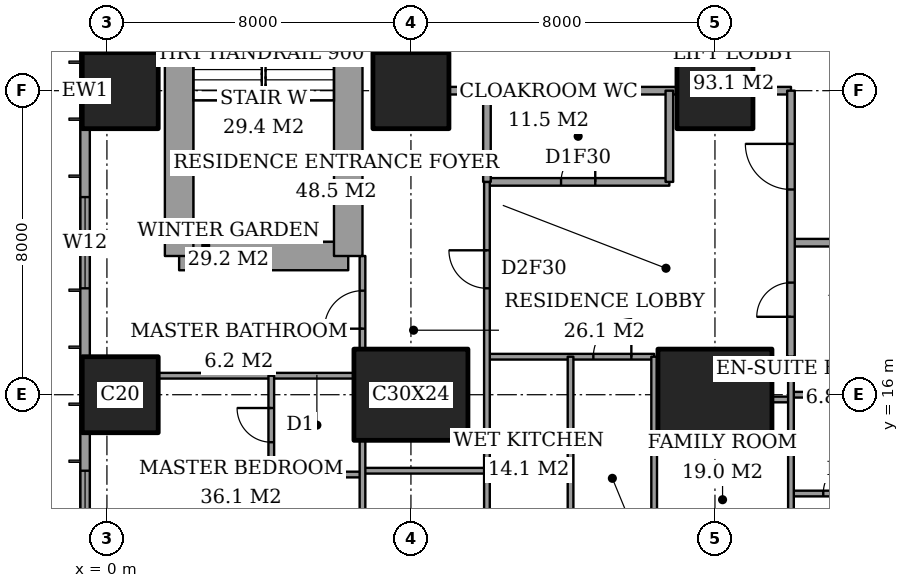
"""IFC4 building model, lengths in metres.
Left out: names, types, materials, properties, quantities, classifications, styles, units other than length and angle.
Written with IfcOpenShell. Run it as: python <this file> out.ifc"""

import sys

from ifc_helpers import new_model, si_unit, direction, frame, frame_2d, origin, origin_2d, place, context, subcontext, project, spatial, rectangle, extrude, element, fill, save


model = new_model("IFC4")
c1 = context("Model", 3, precision=1e-05, world=origin(), true_north=direction((0.0, 1.0)))
c2 = subcontext(c1, "Body", "Model", "MODEL_VIEW")
j1 = project(units=[si_unit("LENGTHUNIT", "METRE"), si_unit("PLANEANGLEUNIT", "RADIAN")], contexts=[c1])
p1 = place(None, origin())
s1 = spatial("IfcSite", under=j1, at=p1, CompositionType="ELEMENT")
p2 = place(p1, origin())
s2 = spatial("IfcBuilding", under=s1, at=p2, CompositionType="ELEMENT")
p3 = place(p2, frame((0.0, 0.0, 135.8)))
s3 = spatial("IfcBuildingStorey", under=s2, at=p3, CompositionType="ELEMENT", Elevation=135.8)
for number, where, z_axis, x_axis in (
    (1, (0.35, 16.0, 0.0), (0.0, 0.0, 1.0), (1.0, 0.0, 0.0)),
    (2, (0.35, 24.0, 0.0), (0.0, 0.0, 1.0), (1.0, 0.0, 0.0)),
):
    element("IfcColumn", number, at=place(p3, frame(where, z_axis=z_axis, x_axis=x_axis)), inside=s3, PredefinedType="COLUMN", context=c2, shape_type="SweptSolid", body=[
        extrude(rectangle(XDim=2.0, YDim=2.0, at=origin_2d()), origin(), (0.0, 0.0, 1.0), 3.6),
    ])
p4 = place(p3, frame((8.0, 16.0, 0.0), z_axis=(0.0, 0.0, 1.0), x_axis=(1.0, 0.0, 0.0)))
e3 = element("IfcColumn", 3, at=p4, inside=s3, PredefinedType="COLUMN", context=c2, shape_type="SweptSolid", body=[
    extrude(rectangle(XDim=3.0, YDim=2.4, at=origin_2d()), origin(), (0.0, 0.0, 1.0), 3.6),
])
p5 = place(p3, frame((8.0, 24.0, 0.0), z_axis=(0.0, 0.0, 1.0), x_axis=(1.0, 0.0, 0.0)))
e4 = element("IfcColumn", 4, at=p5, inside=s3, PredefinedType="COLUMN", context=c2, shape_type="SweptSolid", body=[
    extrude(rectangle(XDim=2.0, YDim=2.0, at=origin_2d()), origin(), (0.0, 0.0, 1.0), 3.6),
])
p6 = place(p3, frame((16.0, 16.0, 0.0), z_axis=(0.0, 0.0, 1.0), x_axis=(1.0, 0.0, 0.0)))
e5 = element("IfcColumn", 5, at=p6, inside=s3, PredefinedType="COLUMN", context=c2, shape_type="SweptSolid", body=[
    extrude(rectangle(XDim=3.0, YDim=2.4, at=origin_2d()), origin(), (0.0, 0.0, 1.0), 3.6),
])
p7 = place(p3, frame((16.0, 24.0, 0.0), z_axis=(0.0, 0.0, 1.0), x_axis=(1.0, 0.0, 0.0)))
e6 = element("IfcColumn", 6, at=p7, inside=s3, PredefinedType="COLUMN", context=c2, shape_type="SweptSolid", body=[
    extrude(rectangle(XDim=2.0, YDim=2.0, at=origin_2d()), origin(), (0.0, 0.0, 1.0), 3.6),
])
p8 = place(p3, frame((1.9, 19.65, 0.0), z_axis=(0.0, 0.0, 1.0), x_axis=(1.0, 0.0, 0.0)))
e7 = element("IfcWall", 7, at=p8, inside=s3, PredefinedType="SHEAR", context=c2, shape_type="SweptSolid", body=[
    extrude(rectangle(XDim=4.45, YDim=0.75, at=frame_2d((2.225, 0.0))), origin(), (0.0, 0.0, 1.0), 3.6),
])
p9 = place(p3, frame((6.35, 19.65, 0.0), z_axis=(0.0, 0.0, 1.0), x_axis=(0.0, 1.0, 0.0)))
e8 = element("IfcWall", 8, at=p9, inside=s3, PredefinedType="SHEAR", context=c2, shape_type="SweptSolid", body=[
    extrude(rectangle(XDim=8.7, YDim=0.75, at=frame_2d((4.35, 0.0))), origin(), (0.0, 0.0, 1.0), 3.6),
])
p10 = place(p9, frame((6.725, 0.0, 0.0)))
e9 = element("IfcOpeningElement", 9, at=p10, cuts=e8, PredefinedType="OPENING", context=c2, shape_type="SweptSolid", body=[
    extrude(rectangle(XDim=1.0, YDim=2.1, at=frame_2d((0.5, 1.05))), frame((0.0, 0.385, 0.0), z_axis=(0.0, -1.0, 0.0), x_axis=(1.0, 0.0, 0.0)), (0.0, 0.0, 1.0), 0.77),
])
p11 = place(p3, frame((1.9, 28.35, 0.0), z_axis=(0.0, 0.0, 1.0), x_axis=(0.0, -1.0, 0.0)))
e10 = element("IfcWall", 10, at=p11, inside=s3, PredefinedType="SHEAR", context=c2, shape_type="SweptSolid", body=[
    extrude(rectangle(XDim=8.7, YDim=0.75, at=frame_2d((4.35, 0.0))), origin(), (0.0, 0.0, 1.0), 3.6),
])
p12 = place(p3, frame((-0.575, 44.825, 0.0), z_axis=(0.0, 0.0, 1.0), x_axis=(0.0, -1.0, 0.0)))
e11 = element("IfcWall", 11, at=p12, inside=s3, PredefinedType="SOLIDWALL", context=c2, shape_type="SweptSolid", body=[
    extrude(rectangle(XDim=41.65, YDim=0.25, at=frame_2d((20.825, 0.0))), origin(), (0.0, 0.0, 1.0), 3.6),
])
p13 = place(p12, frame((0.775, 0.0, 0.4)))
e12 = element("IfcOpeningElement", 12, at=p13, cuts=e11, PredefinedType="OPENING", context=c2, shape_type="SweptSolid", body=[
    extrude(rectangle(XDim=2.4, YDim=2.2, at=frame_2d((1.2, 1.1))), frame((0.0, 0.135, 0.0), z_axis=(0.0, -1.0, 0.0), x_axis=(1.0, 0.0, 0.0)), (0.0, 0.0, 1.0), 0.27),
])
p14 = place(p12, frame((6.1, 0.0, 0.4)))
e13 = element("IfcOpeningElement", 13, at=p14, cuts=e11, PredefinedType="OPENING", context=c2, shape_type="SweptSolid", body=[
    extrude(rectangle(XDim=1.2, YDim=2.2, at=frame_2d((0.6, 1.1))), frame((0.0, 0.135, 0.0), z_axis=(0.0, -1.0, 0.0), x_axis=(1.0, 0.0, 0.0)), (0.0, 0.0, 1.0), 0.27),
])
p15 = place(p12, frame((8.425, 0.0, 0.4)))
e14 = element("IfcOpeningElement", 14, at=p15, cuts=e11, PredefinedType="OPENING", context=c2, shape_type="SweptSolid", body=[
    extrude(rectangle(XDim=2.4, YDim=2.2, at=frame_2d((1.2, 1.1))), frame((0.0, 0.135, 0.0), z_axis=(0.0, -1.0, 0.0), x_axis=(1.0, 0.0, 0.0)), (0.0, 0.0, 1.0), 0.27),
])
p16 = place(p12, frame((15.625, 0.0, 0.4)))
e15 = element("IfcOpeningElement", 15, at=p16, cuts=e11, PredefinedType="OPENING", context=c2, shape_type="SweptSolid", body=[
    extrude(rectangle(XDim=2.4, YDim=2.2, at=frame_2d((1.2, 1.1))), frame((0.0, 0.135, 0.0), z_axis=(0.0, -1.0, 0.0), x_axis=(1.0, 0.0, 0.0)), (0.0, 0.0, 1.0), 0.27),
])
p17 = place(p12, frame((23.625, 0.0, 0.4)))
e16 = element("IfcOpeningElement", 16, at=p17, cuts=e11, PredefinedType="OPENING", context=c2, shape_type="SweptSolid", body=[
    extrude(rectangle(XDim=2.4, YDim=2.2, at=frame_2d((1.2, 1.1))), frame((0.0, 0.135, 0.0), z_axis=(0.0, -1.0, 0.0), x_axis=(1.0, 0.0, 0.0)), (0.0, 0.0, 1.0), 0.27),
])
p18 = place(p12, frame((30.825, 0.0, 0.4)))
e17 = element("IfcOpeningElement", 17, at=p18, cuts=e11, PredefinedType="OPENING", context=c2, shape_type="SweptSolid", body=[
    extrude(rectangle(XDim=2.4, YDim=2.2, at=frame_2d((1.2, 1.1))), frame((0.0, 0.135, 0.0), z_axis=(0.0, -1.0, 0.0), x_axis=(1.0, 0.0, 0.0)), (0.0, 0.0, 1.0), 0.27),
])
p19 = place(p12, frame((34.5, 0.0, 0.4)))
e18 = element("IfcOpeningElement", 18, at=p19, cuts=e11, PredefinedType="OPENING", context=c2, shape_type="SweptSolid", body=[
    extrude(rectangle(XDim=1.2, YDim=2.2, at=frame_2d((0.6, 1.1))), frame((0.0, 0.135, 0.0), z_axis=(0.0, -1.0, 0.0), x_axis=(1.0, 0.0, 0.0)), (0.0, 0.0, 1.0), 0.27),
])
p20 = place(p12, frame((38.475, 0.0, 0.4)))
e19 = element("IfcOpeningElement", 19, at=p20, cuts=e11, PredefinedType="OPENING", context=c2, shape_type="SweptSolid", body=[
    extrude(rectangle(XDim=2.4, YDim=2.2, at=frame_2d((1.2, 1.1))), frame((0.0, 0.135, 0.0), z_axis=(0.0, -1.0, 0.0), x_axis=(1.0, 0.0, 0.0)), (0.0, 0.0, 1.0), 0.27),
])
p21 = place(p3, frame((18.0, 13.4, 0.0), z_axis=(0.0, 0.0, 1.0), x_axis=(1.0, 0.0, 0.0)))
e20 = element("IfcWall", 20, at=p21, inside=s3, PredefinedType="PARTITIONING", context=c2, shape_type="SweptSolid", body=[
    extrude(rectangle(XDim=2.6, YDim=0.15, at=frame_2d((1.3, 0.0))), origin(), (0.0, 0.0, 1.0), 3.35),
])
p22 = place(p21, frame((0.85, 0.0, 0.0)))
e21 = element("IfcOpeningElement", 21, at=p22, cuts=e20, PredefinedType="OPENING", context=c2, shape_type="SweptSolid", body=[
    extrude(rectangle(XDim=0.9, YDim=2.1, at=frame_2d((0.45, 1.05))), frame((0.0, 0.085, 0.0), z_axis=(0.0, -1.0, 0.0), x_axis=(1.0, 0.0, 0.0)), (0.0, 0.0, 1.0), 0.17),
])
p23 = place(p3, frame((4.325, 13.9, 0.0), z_axis=(0.0, 0.0, 1.0), x_axis=(1.0, 0.0, 0.0)))
e22 = element("IfcWall", 22, at=p23, inside=s3, PredefinedType="PARTITIONING", context=c2, shape_type="SweptSolid", body=[
    extrude(rectangle(XDim=2.4, YDim=0.15, at=frame_2d((1.2, 0.0))), origin(), (0.0, 0.0, 1.0), 3.35),
])
p24 = place(p3, frame((6.725, 14.0, 0.0), z_axis=(0.0, 0.0, 1.0), x_axis=(1.0, 0.0, 0.0)))
e23 = element("IfcWall", 23, at=p24, inside=s3, PredefinedType="PARTITIONING", context=c2, shape_type="SweptSolid", body=[
    extrude(rectangle(XDim=3.275, YDim=0.15, at=frame_2d((1.637, 0.0))), origin(), (0.0, 0.0, 1.0), 3.35),
])
p25 = place(p3, frame((17.5, 15.875, 0.0), z_axis=(0.0, 0.0, 1.0), x_axis=(1.0, 0.0, 0.0)))
e24 = element("IfcWall", 24, at=p25, inside=s3, PredefinedType="PARTITIONING", context=c2, shape_type="SweptSolid", body=[
    extrude(rectangle(XDim=0.5, YDim=0.15, at=frame_2d((0.25, 0.0))), origin(), (0.0, 0.0, 1.0), 2.634),
])
p26 = place(p3, frame((18.0, 16.0, 0.0), z_axis=(0.0, 0.0, 1.0), x_axis=(1.0, 0.0, 0.0)))
e25 = element("IfcWall", 25, at=p26, inside=s3, PredefinedType="PARTITIONING", context=c2, shape_type="SweptSolid", body=[
    extrude(rectangle(XDim=6.0, YDim=0.15, at=frame_2d((3.0, 0.0))), origin(), (0.0, 0.0, 1.0), 2.634),
])
p27 = place(p3, frame((1.35, 16.5, 0.0), z_axis=(0.0, 0.0, 1.0), x_axis=(1.0, 0.0, 0.0)))
e26 = element("IfcWall", 26, at=p27, inside=s3, PredefinedType="PARTITIONING", context=c2, shape_type="SweptSolid", body=[
    extrude(rectangle(XDim=5.15, YDim=0.15, at=frame_2d((2.575, 0.0))), origin(), (0.0, 0.0, 1.0), 3.35),
])
p28 = place(p3, frame((10.0, 17.0, 0.0), z_axis=(0.0, 0.0, 1.0), x_axis=(1.0, 0.0, 0.0)))
e27 = element("IfcWall", 27, at=p28, inside=s3, PredefinedType="PARTITIONING", context=c2, shape_type="SweptSolid", body=[
    extrude(rectangle(XDim=4.4, YDim=0.15, at=frame_2d((2.2, 0.0))), origin(), (0.0, 0.0, 1.0), 3.35),
])
p29 = place(p28, frame((2.8, 0.0, 0.0)))
e28 = element("IfcOpeningElement", 28, at=p29, cuts=e27, PredefinedType="OPENING", context=c2, shape_type="SweptSolid", body=[
    extrude(rectangle(XDim=1.0, YDim=2.1, at=frame_2d((0.5, 1.05))), frame((0.0, 0.085, 0.0), z_axis=(0.0, -1.0, 0.0), x_axis=(1.0, 0.0, 0.0)), (0.0, 0.0, 1.0), 0.17),
])
p30 = place(p3, frame((18.0, 20.0, 0.0), z_axis=(0.0, 0.0, 1.0), x_axis=(1.0, 0.0, 0.0)))
e29 = element("IfcWall", 29, at=p30, inside=s3, PredefinedType="PARTITIONING", context=c2, shape_type="SweptSolid", body=[
    extrude(rectangle(XDim=6.0, YDim=0.2, at=frame_2d((3.0, 0.0))), origin(), (0.0, 0.0, 1.0), 3.35),
])
p31 = place(p3, frame((10.0, 21.6, 0.0), z_axis=(0.0, 0.0, 1.0), x_axis=(1.0, 0.0, 0.0)))
e30 = element("IfcWall", 30, at=p31, inside=s3, PredefinedType="PARTITIONING", context=c2, shape_type="SweptSolid", body=[
    extrude(rectangle(XDim=4.8, YDim=0.2, at=frame_2d((2.4, 0.0))), origin(), (0.0, 0.0, 1.0), 3.35),
])
p32 = place(p31, frame((1.95, 0.0, 0.0)))
e31 = element("IfcOpeningElement", 31, at=p32, cuts=e30, PredefinedType="OPENING", context=c2, shape_type="SweptSolid", body=[
    extrude(rectangle(XDim=0.9, YDim=2.1, at=frame_2d((0.45, 1.05))), frame((0.0, 0.11, 0.0), z_axis=(0.0, -1.0, 0.0), x_axis=(1.0, 0.0, 0.0)), (0.0, 0.0, 1.0), 0.22),
])
p33 = place(p3, frame((9.0, 24.0, 0.0), z_axis=(0.0, 0.0, 1.0), x_axis=(1.0, 0.0, 0.0)))
e32 = element("IfcWall", 32, at=p33, inside=s3, PredefinedType="PARTITIONING", context=c2, shape_type="SweptSolid", body=[
    extrude(rectangle(XDim=6.0, YDim=0.2, at=frame_2d((3.0, 0.0))), origin(), (0.0, 0.0, 1.0), 3.35),
])
p34 = place(p3, frame((17.0, 24.0, 0.0), z_axis=(0.0, 0.0, 1.0), x_axis=(1.0, 0.0, 0.0)))
e33 = element("IfcWall", 33, at=p34, inside=s3, PredefinedType="PARTITIONING", context=c2, shape_type="SweptSolid", body=[
    extrude(rectangle(XDim=1.0, YDim=0.2, at=frame_2d((0.5, 0.0))), origin(), (0.0, 0.0, 1.0), 3.35),
])
p35 = place(p3, frame((4.325, 13.9, 0.0), z_axis=(0.0, 0.0, 1.0), x_axis=(0.0, 1.0, 0.0)))
e34 = element("IfcWall", 34, at=p35, inside=s3, PredefinedType="PARTITIONING", context=c2, shape_type="SweptSolid", body=[
    extrude(rectangle(XDim=2.6, YDim=0.15, at=frame_2d((1.3, 0.0))), origin(), (0.0, 0.0, 1.0), 3.35),
])
p36 = place(p35, frame((0.85, 0.0, 0.0)))
e35 = element("IfcOpeningElement", 35, at=p36, cuts=e34, PredefinedType="OPENING", context=c2, shape_type="SweptSolid", body=[
    extrude(rectangle(XDim=0.9, YDim=2.1, at=frame_2d((0.45, 1.05))), frame((0.0, 0.085, 0.0), z_axis=(0.0, -1.0, 0.0), x_axis=(1.0, 0.0, 0.0)), (0.0, 0.0, 1.0), 0.17),
])
p37 = place(p3, frame((6.725, 10.6, 0.0), z_axis=(0.0, 0.0, 1.0), x_axis=(0.0, 1.0, 0.0)))
e36 = element("IfcWall", 36, at=p37, inside=s3, PredefinedType="PARTITIONING", context=c2, shape_type="SweptSolid", body=[
    extrude(rectangle(XDim=4.2, YDim=0.15, at=frame_2d((2.1, 0.0))), origin(), (0.0, 0.0, 1.0), 3.35),
])
p38 = place(p37, frame((1.2, 0.0, 0.0)))
e37 = element("IfcOpeningElement", 37, at=p38, cuts=e36, PredefinedType="OPENING", context=c2, shape_type="SweptSolid", body=[
    extrude(rectangle(XDim=0.9, YDim=2.1, at=frame_2d((0.45, 1.05))), frame((0.0, 0.085, 0.0), z_axis=(0.0, -1.0, 0.0), x_axis=(1.0, 0.0, 0.0)), (0.0, 0.0, 1.0), 0.17),
])
p39 = place(p3, frame((6.725, 17.2, 0.0), z_axis=(0.0, 0.0, 1.0), x_axis=(0.0, 1.0, 0.0)))
e38 = element("IfcWall", 38, at=p39, inside=s3, PredefinedType="PARTITIONING", context=c2, shape_type="SweptSolid", body=[
    extrude(rectangle(XDim=2.45, YDim=0.15, at=frame_2d((1.225, 0.0))), origin(), (0.0, 0.0, 1.0), 3.35),
])
p40 = place(p39, frame((0.538, 0.0, 0.0)))
e39 = element("IfcOpeningElement", 39, at=p40, cuts=e38, PredefinedType="OPENING", context=c2, shape_type="SweptSolid", body=[
    extrude(rectangle(XDim=1.0, YDim=2.1, at=frame_2d((0.5, 1.05))), frame((0.0, 0.085, 0.0), z_axis=(0.0, -1.0, 0.0), x_axis=(1.0, 0.0, 0.0)), (0.0, 0.0, 1.0), 0.17),
])
p41 = place(p3, frame((10.0, 21.6, 0.0), z_axis=(0.0, 0.0, 1.0), x_axis=(0.0, 1.0, 0.0)))
e40 = element("IfcWall", 40, at=p41, inside=s3, PredefinedType="PARTITIONING", context=c2, shape_type="SweptSolid", body=[
    extrude(rectangle(XDim=2.4, YDim=0.2, at=frame_2d((1.2, 0.0))), origin(), (0.0, 0.0, 1.0), 3.35),
])
p42 = place(p3, frame((10.0, 10.6, 0.0), z_axis=(0.0, 0.0, 1.0), x_axis=(0.0, 1.0, 0.0)))
e41 = element("IfcWall", 41, at=p42, inside=s3, PredefinedType="PARTITIONING", context=c2, shape_type="SweptSolid", body=[
    extrude(rectangle(XDim=11.0, YDim=0.15, at=frame_2d((5.5, 0.0))), origin(), (0.0, 0.0, 1.0), 3.35),
])
p43 = place(p42, frame((8.2, 0.0, 0.0)))
e42 = element("IfcOpeningElement", 42, at=p43, cuts=e41, PredefinedType="OPENING", context=c2, shape_type="SweptSolid", body=[
    extrude(rectangle(XDim=1.0, YDim=2.1, at=frame_2d((0.5, 1.05))), frame((0.0, 0.085, 0.0), z_axis=(0.0, -1.0, 0.0), x_axis=(1.0, 0.0, 0.0)), (0.0, 0.0, 1.0), 0.17),
])
for number, where, z_axis, x_axis in (
    (43, (12.2, 10.6, 0.0), (0.0, 0.0, 1.0), (0.0, 1.0, 0.0)),
    (44, (14.4, 10.6, 0.0), (0.0, 0.0, 1.0), (0.0, 1.0, 0.0)),
):
    element("IfcWall", number, at=place(p3, frame(where, z_axis=z_axis, x_axis=x_axis)), inside=s3, PredefinedType="PARTITIONING", context=c2, shape_type="SweptSolid", body=[
        extrude(rectangle(XDim=6.4, YDim=0.15, at=frame_2d((3.2, 0.0))), origin(), (0.0, 0.0, 1.0), 3.35),
    ])
p44 = place(p3, frame((14.8, 21.6, 0.0), z_axis=(0.0, 0.0, 1.0), x_axis=(0.0, 1.0, 0.0)))
e45 = element("IfcWall", 45, at=p44, inside=s3, PredefinedType="PARTITIONING", context=c2, shape_type="SweptSolid", body=[
    extrude(rectangle(XDim=2.4, YDim=0.2, at=frame_2d((1.2, 0.0))), origin(), (0.0, 0.0, 1.0), 3.35),
])
p45 = place(p3, frame((18.0, 17.0, 0.0), z_axis=(0.0, 0.0, 1.0), x_axis=(0.0, 1.0, 0.0)))
e46 = element("IfcWall", 46, at=p45, inside=s3, PredefinedType="PARTITIONING", context=c2, shape_type="SweptSolid", body=[
    extrude(rectangle(XDim=7.0, YDim=0.2, at=frame_2d((3.5, 0.0))), origin(), (0.0, 0.0, 1.0), 3.35),
])
p46 = place(p45, frame((4.4, 0.0, 0.0)))
e47 = element("IfcOpeningElement", 47, at=p46, cuts=e46, PredefinedType="OPENING", context=c2, shape_type="SweptSolid", body=[
    extrude(rectangle(XDim=1.2, YDim=2.4, at=frame_2d((0.6, 1.2))), frame((0.0, 0.11, 0.0), z_axis=(0.0, -1.0, 0.0), x_axis=(1.0, 0.0, 0.0)), (0.0, 0.0, 1.0), 0.22),
])
p47 = place(p45, frame((1.05, 0.0, 0.0)))
e48 = element("IfcOpeningElement", 48, at=p47, cuts=e46, PredefinedType="OPENING", context=c2, shape_type="SweptSolid", body=[
    extrude(rectangle(XDim=0.9, YDim=2.1, at=frame_2d((0.45, 1.05))), frame((0.0, 0.11, 0.0), z_axis=(0.0, -1.0, 0.0), x_axis=(1.0, 0.0, 0.0)), (0.0, 0.0, 1.0), 0.22),
])
p48 = place(p3, frame((18.0, 10.6, 0.0), z_axis=(0.0, 0.0, 1.0), x_axis=(0.0, 1.0, 0.0)))
e49 = element("IfcWall", 49, at=p48, inside=s3, PredefinedType="PARTITIONING", context=c2, shape_type="SweptSolid", body=[
    extrude(rectangle(XDim=6.4, YDim=0.15, at=frame_2d((3.2, 0.0))), origin(), (0.0, 0.0, 1.0), 3.35),
])
p49 = place(p17, origin())
e50 = element("IfcWindow", 50, at=p49, inside=s3, PartitioningType="SINGLE_PANEL", PredefinedType="WINDOW", context=c2, shape_type="SweptSolid", body=[
    extrude(rectangle(XDim=2.4, YDim=2.2, at=frame_2d((1.2, 1.1))), frame((0.0, 0.03, 0.0), z_axis=(0.0, -1.0, 0.0), x_axis=(1.0, 0.0, 0.0)), (0.0, 0.0, 1.0), 0.06),
])
fill(e16, e50)
p50 = place(p18, origin())
e51 = element("IfcWindow", 51, at=p50, inside=s3, PartitioningType="SINGLE_PANEL", PredefinedType="WINDOW", context=c2, shape_type="SweptSolid", body=[
    extrude(rectangle(XDim=2.4, YDim=2.2, at=frame_2d((1.2, 1.1))), frame((0.0, 0.03, 0.0), z_axis=(0.0, -1.0, 0.0), x_axis=(1.0, 0.0, 0.0)), (0.0, 0.0, 1.0), 0.06),
])
fill(e17, e51)
p51 = place(p36, origin())
e52 = element("IfcDoor", 52, at=p51, inside=s3, OperationType="SINGLE_SWING_LEFT", PredefinedType="DOOR", context=c2, shape_type="SweptSolid", body=[
    extrude(rectangle(XDim=0.9, YDim=2.1, at=frame_2d((0.45, 1.05))), frame((0.0, 0.025, 0.0), z_axis=(0.0, -1.0, 0.0), x_axis=(1.0, 0.0, 0.0)), (0.0, 0.0, 1.0), 0.05),
])
fill(e35, e52)
p52 = place(p40, origin())
e53 = element("IfcDoor", 53, at=p52, inside=s3, OperationType="SINGLE_SWING_RIGHT", PredefinedType="DOOR", context=c2, shape_type="SweptSolid", body=[
    extrude(rectangle(XDim=1.0, YDim=2.1, at=frame_2d((0.5, 1.05))), frame((0.0, 0.025, 0.0), z_axis=(0.0, -1.0, 0.0), x_axis=(1.0, 0.0, 0.0)), (0.0, 0.0, 1.0), 0.05),
])
fill(e39, e53)
p53 = place(p43, origin())
e54 = element("IfcDoor", 54, at=p53, inside=s3, OperationType="SINGLE_SWING_LEFT", PredefinedType="DOOR", context=c2, shape_type="SweptSolid", body=[
    extrude(rectangle(XDim=1.0, YDim=2.1, at=frame_2d((0.5, 1.05))), frame((0.0, 0.025, 0.0), z_axis=(0.0, -1.0, 0.0), x_axis=(1.0, 0.0, 0.0)), (0.0, 0.0, 1.0), 0.05),
])
fill(e42, e54)
p54 = place(p32, origin())
e55 = element("IfcDoor", 55, at=p54, inside=s3, OperationType="SINGLE_SWING_LEFT", PredefinedType="DOOR", context=c2, shape_type="SweptSolid", body=[
    extrude(rectangle(XDim=0.9, YDim=2.1, at=frame_2d((0.45, 1.05))), frame((0.0, 0.025, 0.0), z_axis=(0.0, -1.0, 0.0), x_axis=(1.0, 0.0, 0.0)), (0.0, 0.0, 1.0), 0.05),
])
fill(e31, e55)
p55 = place(p46, origin())
e56 = element("IfcDoor", 56, at=p55, inside=s3, OperationType="SINGLE_SWING_LEFT", PredefinedType="DOOR", context=c2, shape_type="SweptSolid", body=[
    extrude(rectangle(XDim=1.2, YDim=2.4, at=frame_2d((0.6, 1.2))), frame((0.0, 0.025, 0.0), z_axis=(0.0, -1.0, 0.0), x_axis=(1.0, 0.0, 0.0)), (0.0, 0.0, 1.0), 0.05),
])
fill(e47, e56)
p56 = place(p29, origin())
e57 = element("IfcDoor", 57, at=p56, inside=s3, OperationType="SINGLE_SWING_LEFT", PredefinedType="DOOR", context=c2, shape_type="SweptSolid", body=[
    extrude(rectangle(XDim=1.0, YDim=2.1, at=frame_2d((0.5, 1.05))), frame((0.0, 0.025, 0.0), z_axis=(0.0, -1.0, 0.0), x_axis=(1.0, 0.0, 0.0)), (0.0, 0.0, 1.0), 0.05),
])
fill(e28, e57)
p57 = place(p22, origin())
e58 = element("IfcDoor", 58, at=p57, inside=s3, OperationType="SINGLE_SWING_LEFT", PredefinedType="DOOR", context=c2, shape_type="SweptSolid", body=[
    extrude(rectangle(XDim=0.9, YDim=2.1, at=frame_2d((0.45, 1.05))), frame((0.0, 0.025, 0.0), z_axis=(0.0, -1.0, 0.0), x_axis=(1.0, 0.0, 0.0)), (0.0, 0.0, 1.0), 0.05),
])
fill(e21, e58)
p58 = place(p47, origin())
e59 = element("IfcDoor", 59, at=p58, inside=s3, OperationType="SINGLE_SWING_RIGHT", PredefinedType="DOOR", context=c2, shape_type="SweptSolid", body=[
    extrude(rectangle(XDim=0.9, YDim=2.1, at=frame_2d((0.45, 1.05))), frame((0.0, 0.025, 0.0), z_axis=(0.0, -1.0, 0.0), x_axis=(1.0, 0.0, 0.0)), (0.0, 0.0, 1.0), 0.05),
])
fill(e48, e59)
save(model, sys.argv[1])
